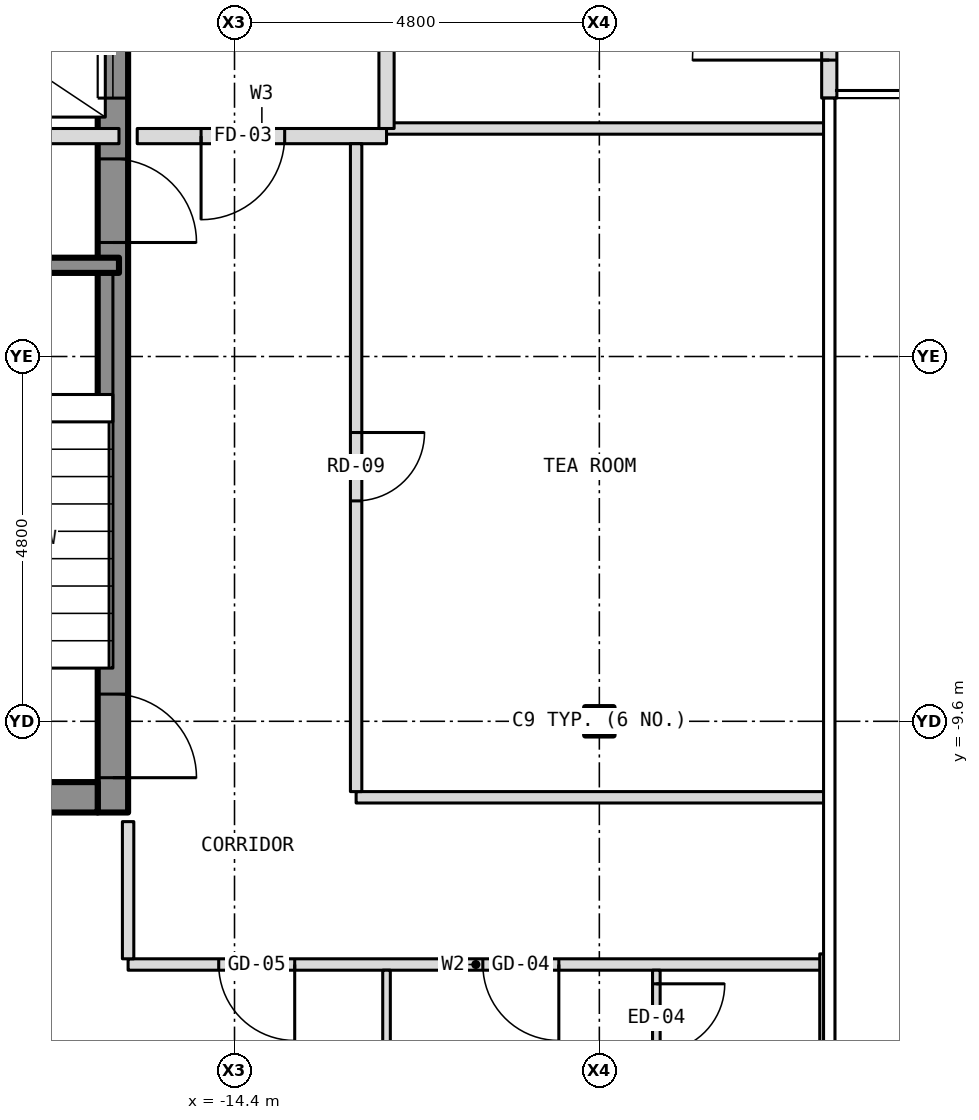
"""IFC4 building model, lengths in metres.
Left out: names, types, materials, properties, quantities, classifications, styles, units other than length and angle.
Written with IfcOpenShell. Run it as: python <this file> out.ifc"""

import sys

from ifc_helpers import new_model, si_unit, direction, frame, frame_2d, origin, origin_2d, place, context, subcontext, project, spatial, rectangle, i_section, extrude, element, fill, save


model = new_model("IFC4")
c1 = context("Model", 3, precision=1e-05, world=origin(), true_north=direction((0.0, 1.0)))
c2 = subcontext(c1, "Body", "Model", "MODEL_VIEW")
j1 = project(units=[si_unit("LENGTHUNIT", "METRE"), si_unit("PLANEANGLEUNIT", "RADIAN")], contexts=[c1])
p1 = place(None, origin())
s1 = spatial("IfcSite", under=j1, at=p1, CompositionType="ELEMENT")
p2 = place(p1, origin())
s2 = spatial("IfcBuilding", under=s1, at=p2, CompositionType="ELEMENT")
p3 = place(p2, frame((0.0, 0.0, 226.0)))
s3 = spatial("IfcBuildingStorey", under=s2, at=p3, CompositionType="ELEMENT", Elevation=226.0)
p4 = place(p3, frame((-9.6, -9.6, -0.15), z_axis=(0.0, 0.0, 1.0), x_axis=(1.0, 0.0, 0.0)))
e1 = element("IfcColumn", 1, at=p4, inside=s3, PredefinedType="COLUMN", context=c2, shape_type="SweptSolid", body=[
    extrude(i_section(OverallWidth=0.373, OverallDepth=0.373, WebThickness=0.016, FlangeThickness=0.026, at=origin_2d()), origin(), (0.0, 0.0, 1.0), 3.5),
])
p5 = place(p3, frame((-16.0, -10.8, 0.0), z_axis=(0.0, 0.0, 1.0), x_axis=(0.0, 1.0, 0.0)))
e2 = element("IfcWall", 2, at=p5, inside=s3, PredefinedType="SHEAR", context=c2, shape_type="SweptSolid", body=[
    extrude(rectangle(XDim=21.6, YDim=0.4, at=frame_2d((10.8, 0.0))), origin(), (0.0, 0.0, 1.0), 3.25),
])
p6 = place(p5, frame((9.4, 0.0, 0.0)))
e3 = element("IfcOpeningElement", 3, at=p6, cuts=e2, PredefinedType="OPENING", context=c2, shape_type="SweptSolid", body=[
    extrude(rectangle(XDim=1.1, YDim=2.1, at=frame_2d((0.55, 1.05))), frame((0.0, 0.212, 0.0), z_axis=(0.0, -1.0, 0.0), x_axis=(1.0, 0.0, 0.0)), (0.0, 0.0, 1.0), 0.424),
])
p7 = place(p5, frame((11.5, 0.0, 0.0)))
e4 = element("IfcOpeningElement", 4, at=p7, cuts=e2, PredefinedType="OPENING", context=c2, shape_type="SweptSolid", body=[
    extrude(rectangle(XDim=1.1, YDim=2.1, at=frame_2d((0.55, 1.05))), frame((0.0, 0.212, 0.0), z_axis=(0.0, -1.0, 0.0), x_axis=(1.0, 0.0, 0.0)), (0.0, 0.0, 1.0), 0.424),
])
p8 = place(p5, frame((13.6, 0.0, 0.0)))
e5 = element("IfcOpeningElement", 5, at=p8, cuts=e2, PredefinedType="OPENING", context=c2, shape_type="SweptSolid", body=[
    extrude(rectangle(XDim=1.1, YDim=2.1, at=frame_2d((0.55, 1.05))), frame((0.0, 0.212, 0.0), z_axis=(0.0, -1.0, 0.0), x_axis=(1.0, 0.0, 0.0)), (0.0, 0.0, 1.0), 0.424),
])
p9 = place(p5, frame((15.7, 0.0, 0.0)))
e6 = element("IfcOpeningElement", 6, at=p9, cuts=e2, PredefinedType="OPENING", context=c2, shape_type="SweptSolid", body=[
    extrude(rectangle(XDim=1.1, YDim=2.1, at=frame_2d((0.55, 1.05))), frame((0.0, 0.212, 0.0), z_axis=(0.0, -1.0, 0.0), x_axis=(1.0, 0.0, 0.0)), (0.0, 0.0, 1.0), 0.424),
])
p10 = place(p5, frame((17.8, 0.0, 0.0)))
e7 = element("IfcOpeningElement", 7, at=p10, cuts=e2, PredefinedType="OPENING", context=c2, shape_type="SweptSolid", body=[
    extrude(rectangle(XDim=1.1, YDim=2.1, at=frame_2d((0.55, 1.05))), frame((0.0, 0.212, 0.0), z_axis=(0.0, -1.0, 0.0), x_axis=(1.0, 0.0, 0.0)), (0.0, 0.0, 1.0), 0.424),
])
p11 = place(p5, frame((0.458, 0.0, 0.0)))
e8 = element("IfcOpeningElement", 8, at=p11, cuts=e2, PredefinedType="OPENING", context=c2, shape_type="SweptSolid", body=[
    extrude(rectangle(XDim=1.1, YDim=2.1, at=frame_2d((0.55, 1.05))), frame((0.0, 0.212, 0.0), z_axis=(0.0, -1.0, 0.0), x_axis=(1.0, 0.0, 0.0)), (0.0, 0.0, 1.0), 0.424),
])
p12 = place(p5, frame((7.5, 0.0, 0.0)))
e9 = element("IfcOpeningElement", 9, at=p12, cuts=e2, PredefinedType="OPENING", context=c2, shape_type="SweptSolid", body=[
    extrude(rectangle(XDim=1.1, YDim=2.1, at=frame_2d((0.55, 1.05))), frame((0.0, 0.212, 0.0), z_axis=(0.0, -1.0, 0.0), x_axis=(1.0, 0.0, 0.0)), (0.0, 0.0, 1.0), 0.424),
])
p13 = place(p5, frame((20.0, 0.0, 0.0)))
e10 = element("IfcOpeningElement", 10, at=p13, cuts=e2, PredefinedType="OPENING", context=c2, shape_type="SweptSolid", body=[
    extrude(rectangle(XDim=0.9, YDim=2.1, at=frame_2d((0.45, 1.05))), frame((0.0, 0.212, 0.0), z_axis=(0.0, -1.0, 0.0), x_axis=(1.0, 0.0, 0.0)), (0.0, 0.0, 1.0), 0.424),
])
p14 = place(p3, frame((-20.0, -10.6, 0.0), z_axis=(0.0, 0.0, 1.0), x_axis=(1.0, 0.0, 0.0)))
e11 = element("IfcWall", 11, at=p14, inside=s3, PredefinedType="SHEAR", context=c2, shape_type="SweptSolid", body=[
    extrude(rectangle(XDim=3.8, YDim=0.4, at=frame_2d((1.9, 0.0))), origin(), (0.0, 0.0, 1.0), 3.25),
])
p15 = place(p3, frame((-6.575, -1.4, 0.0), z_axis=(0.0, 0.0, 1.0), x_axis=(0.0, 1.0, 0.0)))
e12 = element("IfcWall", 12, at=p15, inside=s3, PredefinedType="SOLIDWALL", context=c2, shape_type="SweptSolid", body=[
    extrude(rectangle(XDim=2.8, YDim=0.2, at=frame_2d((1.4, 0.0))), origin(), (0.0, 0.0, 1.0), 3.5),
])
p16 = place(p15, frame((0.5, 0.0, 0.0)))
e13 = element("IfcOpeningElement", 13, at=p16, cuts=e12, PredefinedType="OPENING", context=c2, shape_type="SweptSolid", body=[
    extrude(rectangle(XDim=1.8, YDim=2.1, at=frame_2d((0.9, 1.05))), frame((0.0, 0.112, 0.0), z_axis=(0.0, -1.0, 0.0), x_axis=(1.0, 0.0, 0.0)), (0.0, 0.0, 1.0), 0.224),
])
p17 = place(p3, frame((-15.8, -12.8, 0.0), z_axis=(0.0, 0.0, 1.0), x_axis=(1.0, 0.0, 0.0)))
e14 = element("IfcWall", 14, at=p17, inside=s3, PredefinedType="PARTITIONING", context=c2, shape_type="SweptSolid", body=[
    extrude(rectangle(XDim=9.15, YDim=0.15, at=frame_2d((4.575, 0.0))), origin(), (0.0, 0.0, 1.0), 3.35),
])
p18 = place(p17, frame((4.667, 0.0, 0.0)))
e15 = element("IfcOpeningElement", 15, at=p18, cuts=e14, PredefinedType="OPENING", context=c2, shape_type="SweptSolid", body=[
    extrude(rectangle(XDim=1.0, YDim=2.1, at=frame_2d((0.5, 1.05))), frame((0.0, 0.087, 0.0), z_axis=(0.0, -1.0, 0.0), x_axis=(1.0, 0.0, 0.0)), (0.0, 0.0, 1.0), 0.174),
])
p19 = place(p17, frame((1.192, 0.0, 0.0)))
e16 = element("IfcOpeningElement", 16, at=p19, cuts=e14, PredefinedType="OPENING", context=c2, shape_type="SweptSolid", body=[
    extrude(rectangle(XDim=1.0, YDim=2.1, at=frame_2d((0.5, 1.05))), frame((0.0, 0.087, 0.0), z_axis=(0.0, -1.0, 0.0), x_axis=(1.0, 0.0, 0.0)), (0.0, 0.0, 1.0), 0.174),
])
p20 = place(p3, frame((-12.8, -10.6, 0.0), z_axis=(0.0, 0.0, 1.0), x_axis=(1.0, 0.0, 0.0)))
e17 = element("IfcWall", 17, at=p20, inside=s3, PredefinedType="PARTITIONING", context=c2, shape_type="SweptSolid", body=[
    extrude(rectangle(XDim=6.18, YDim=0.15, at=frame_2d((3.09, 0.0))), origin(), (0.0, 0.0, 1.0), 3.35),
])
p21 = place(p3, frame((-20.28, -3.6, 0.0), z_axis=(0.0, 0.0, 1.0), x_axis=(1.0, 0.0, 0.0)))
e18 = element("IfcWall", 18, at=p21, inside=s3, PredefinedType="SHEAR", context=c2, shape_type="SweptSolid", body=[
    extrude(rectangle(XDim=4.36, YDim=0.2, at=frame_2d((2.18, 0.0))), origin(), (0.0, 0.0, 1.0), 3.25),
])
p22 = place(p3, frame((-20.28, -1.9, 0.0), z_axis=(0.0, 0.0, 1.0), x_axis=(1.0, 0.0, 0.0)))
e19 = element("IfcWall", 19, at=p22, inside=s3, PredefinedType="PARTITIONING", context=c2, shape_type="SweptSolid", body=[
    extrude(rectangle(XDim=4.36, YDim=0.2, at=frame_2d((2.18, 0.0))), origin(), (0.0, 0.0, 1.0), 3.25),
])
p23 = place(p22, frame((0.28, 0.0, 0.0)))
e20 = element("IfcOpeningElement", 20, at=p23, cuts=e19, PredefinedType="OPENING", context=c2, shape_type="SweptSolid", body=[
    extrude(rectangle(XDim=0.9, YDim=2.1, at=frame_2d((0.45, 1.05))), frame((0.0, 0.112, 0.0), z_axis=(0.0, -1.0, 0.0), x_axis=(1.0, 0.0, 0.0)), (0.0, 0.0, 1.0), 0.224),
])
p24 = place(p3, frame((-15.68, -1.9, 0.0), z_axis=(0.0, 0.0, 1.0), x_axis=(1.0, 0.0, 0.0)))
e21 = element("IfcWall", 21, at=p24, inside=s3, PredefinedType="PARTITIONING", context=c2, shape_type="SweptSolid", body=[
    extrude(rectangle(XDim=3.28, YDim=0.2, at=frame_2d((1.64, 0.0))), origin(), (0.0, 0.0, 1.0), 3.35),
])
p25 = place(p24, frame((0.84, 0.0, 0.0)))
e22 = element("IfcOpeningElement", 22, at=p25, cuts=e21, PredefinedType="OPENING", context=c2, shape_type="SweptSolid", body=[
    extrude(rectangle(XDim=1.1, YDim=2.1, at=frame_2d((0.55, 1.05))), frame((0.0, 0.112, 0.0), z_axis=(0.0, -1.0, 0.0), x_axis=(1.0, 0.0, 0.0)), (0.0, 0.0, 1.0), 0.224),
])
p26 = place(p3, frame((-12.4, -1.8, 0.0), z_axis=(0.0, 0.0, 1.0), x_axis=(1.0, 0.0, 0.0)))
e23 = element("IfcWall", 23, at=p26, inside=s3, PredefinedType="PARTITIONING", context=c2, shape_type="SweptSolid", body=[
    extrude(rectangle(XDim=5.78, YDim=0.15, at=frame_2d((2.89, 0.0))), origin(), (0.0, 0.0, 1.0), 3.35),
])
p27 = place(p3, frame((-15.8, -12.725, 0.0), z_axis=(0.0, 0.0, 1.0), x_axis=(0.0, 1.0, 0.0)))
e24 = element("IfcWall", 24, at=p27, inside=s3, PredefinedType="PARTITIONING", context=c2, shape_type="SweptSolid", body=[
    extrude(rectangle(XDim=1.805, YDim=0.15, at=frame_2d((0.903, 0.0))), origin(), (0.0, 0.0, 1.0), 3.35),
])
p28 = place(p3, frame((-12.8, -10.525, 0.0), z_axis=(0.0, 0.0, 1.0), x_axis=(0.0, 1.0, 0.0)))
e25 = element("IfcWall", 25, at=p28, inside=s3, PredefinedType="PARTITIONING", context=c2, shape_type="SweptSolid", body=[
    extrude(rectangle(XDim=8.525, YDim=0.15, at=frame_2d((4.262, 0.0))), origin(), (0.0, 0.0, 1.0), 3.35),
])
p29 = place(p28, frame((3.825, 0.0, 0.0)))
e26 = element("IfcOpeningElement", 26, at=p29, cuts=e25, PredefinedType="OPENING", context=c2, shape_type="SweptSolid", body=[
    extrude(rectangle(XDim=0.9, YDim=2.1, at=frame_2d((0.45, 1.05))), frame((0.0, 0.087, 0.0), z_axis=(0.0, -1.0, 0.0), x_axis=(1.0, 0.0, 0.0)), (0.0, 0.0, 1.0), 0.174),
])
p30 = place(p3, frame((-12.4, -20.78, 0.0), z_axis=(0.0, 0.0, 1.0), x_axis=(0.0, 1.0, 0.0)))
e27 = element("IfcWall", 27, at=p30, inside=s3, PredefinedType="PARTITIONING", context=c2, shape_type="SweptSolid", body=[
    extrude(rectangle(XDim=7.905, YDim=0.1, at=frame_2d((3.953, 0.0))), origin(), (0.0, 0.0, 1.0), 3.35),
])
p31 = place(p3, frame((-12.4, -1.8, 0.0), z_axis=(0.0, 0.0, 1.0), x_axis=(0.0, 1.0, 0.0)))
e28 = element("IfcWall", 28, at=p31, inside=s3, PredefinedType="PARTITIONING", context=c2, shape_type="SweptSolid", body=[
    extrude(rectangle(XDim=4.0, YDim=0.2, at=frame_2d((2.0, 0.0))), origin(), (0.0, 0.0, 1.0), 3.35),
])
p32 = place(p31, frame((1.25, 0.0, 0.0)))
e29 = element("IfcOpeningElement", 29, at=p32, cuts=e28, PredefinedType="OPENING", context=c2, shape_type="SweptSolid", body=[
    extrude(rectangle(XDim=1.1, YDim=2.1, at=frame_2d((0.55, 1.05))), frame((0.0, 0.112, 0.0), z_axis=(0.0, -1.0, 0.0), x_axis=(1.0, 0.0, 0.0)), (0.0, 0.0, 1.0), 0.224),
])
p33 = place(p3, frame((-8.85, -15.95, 0.0), z_axis=(0.0, 0.0, 1.0), x_axis=(0.0, 1.0, 0.0)))
e30 = element("IfcWall", 30, at=p33, inside=s3, PredefinedType="PARTITIONING", context=c2, shape_type="SweptSolid", body=[
    extrude(rectangle(XDim=3.075, YDim=0.1, at=frame_2d((1.538, 0.0))), origin(), (0.0, 0.0, 1.0), 3.35),
])
p34 = place(p33, frame((1.996, 0.0, 0.0)))
e31 = element("IfcOpeningElement", 31, at=p34, cuts=e30, PredefinedType="OPENING", context=c2, shape_type="SweptSolid", body=[
    extrude(rectangle(XDim=0.9, YDim=2.1, at=frame_2d((0.45, 1.05))), frame((0.0, 0.062, 0.0), z_axis=(0.0, -1.0, 0.0), x_axis=(1.0, 0.0, 0.0)), (0.0, 0.0, 1.0), 0.124),
])
p35 = place(p3, frame((-6.65, -16.14, 0.0), z_axis=(0.0, 0.0, 1.0), x_axis=(0.0, 1.0, 0.0)))
e32 = element("IfcWall", 32, at=p35, inside=s3, PredefinedType="PARTITIONING", context=c2, shape_type="SweptSolid", body=[
    extrude(rectangle(XDim=3.48, YDim=0.1, at=frame_2d((1.74, 0.0))), origin(), (0.0, 0.0, 1.0), 3.35),
])
p36 = place(p16, origin())
e33 = element("IfcDoor", 33, at=p36, inside=s3, OperationType="DOUBLE_DOOR_DOUBLE_SWING", PredefinedType="DOOR", context=c2, shape_type="SweptSolid", body=[
    extrude(rectangle(XDim=1.8, YDim=2.1, at=frame_2d((0.9, 1.05))), frame((0.0, 0.025, 0.0), z_axis=(0.0, -1.0, 0.0), x_axis=(1.0, 0.0, 0.0)), (0.0, 0.0, 1.0), 0.05),
])
fill(e13, e33)
p37 = place(p6, origin())
e34 = element("IfcDoor", 34, at=p37, inside=s3, OperationType="SLIDING_TO_LEFT", PredefinedType="DOOR", context=c2, shape_type="SweptSolid", body=[
    extrude(rectangle(XDim=1.1, YDim=2.1, at=frame_2d((0.55, 1.05))), frame((0.0, 0.025, 0.0), z_axis=(0.0, -1.0, 0.0), x_axis=(1.0, 0.0, 0.0)), (0.0, 0.0, 1.0), 0.05),
])
fill(e3, e34)
p38 = place(p11, origin())
e35 = element("IfcDoor", 35, at=p38, inside=s3, OperationType="SINGLE_SWING_LEFT", PredefinedType="DOOR", context=c2, shape_type="SweptSolid", body=[
    extrude(rectangle(XDim=1.1, YDim=2.1, at=frame_2d((0.55, 1.05))), frame((0.0, 0.025, 0.0), z_axis=(0.0, -1.0, 0.0), x_axis=(1.0, 0.0, 0.0)), (0.0, 0.0, 1.0), 0.05),
])
fill(e8, e35)
p39 = place(p12, origin())
e36 = element("IfcDoor", 36, at=p39, inside=s3, OperationType="SINGLE_SWING_LEFT", PredefinedType="DOOR", context=c2, shape_type="SweptSolid", body=[
    extrude(rectangle(XDim=1.1, YDim=2.1, at=frame_2d((0.55, 1.05))), frame((0.0, 0.025, 0.0), z_axis=(0.0, -1.0, 0.0), x_axis=(1.0, 0.0, 0.0)), (0.0, 0.0, 1.0), 0.05),
])
fill(e9, e36)
p40 = place(p25, origin())
e37 = element("IfcDoor", 37, at=p40, inside=s3, OperationType="SINGLE_SWING_LEFT", PredefinedType="DOOR", context=c2, shape_type="SweptSolid", body=[
    extrude(rectangle(XDim=1.1, YDim=2.1, at=frame_2d((0.55, 1.05))), frame((0.0, 0.025, 0.0), z_axis=(0.0, -1.0, 0.0), x_axis=(1.0, 0.0, 0.0)), (0.0, 0.0, 1.0), 0.05),
])
fill(e22, e37)
p41 = place(p18, origin())
e38 = element("IfcDoor", 38, at=p41, inside=s3, OperationType="SINGLE_SWING_RIGHT", PredefinedType="DOOR", context=c2, shape_type="SweptSolid", body=[
    extrude(rectangle(XDim=1.0, YDim=2.1, at=frame_2d((0.5, 1.05))), frame((0.0, 0.025, 0.0), z_axis=(0.0, -1.0, 0.0), x_axis=(1.0, 0.0, 0.0)), (0.0, 0.0, 1.0), 0.05),
])
fill(e15, e38)
p42 = place(p34, origin())
e39 = element("IfcDoor", 39, at=p42, inside=s3, OperationType="SINGLE_SWING_RIGHT", PredefinedType="DOOR", context=c2, shape_type="SweptSolid", body=[
    extrude(rectangle(XDim=0.9, YDim=2.1, at=frame_2d((0.45, 1.05))), frame((0.0, 0.025, 0.0), z_axis=(0.0, -1.0, 0.0), x_axis=(1.0, 0.0, 0.0)), (0.0, 0.0, 1.0), 0.05),
])
fill(e31, e39)
p43 = place(p19, origin())
e40 = element("IfcDoor", 40, at=p43, inside=s3, OperationType="SINGLE_SWING_RIGHT", PredefinedType="DOOR", context=c2, shape_type="SweptSolid", body=[
    extrude(rectangle(XDim=1.0, YDim=2.1, at=frame_2d((0.5, 1.05))), frame((0.0, 0.025, 0.0), z_axis=(0.0, -1.0, 0.0), x_axis=(1.0, 0.0, 0.0)), (0.0, 0.0, 1.0), 0.05),
])
fill(e16, e40)
p44 = place(p29, origin())
e41 = element("IfcDoor", 41, at=p44, inside=s3, OperationType="SINGLE_SWING_RIGHT", PredefinedType="DOOR", context=c2, shape_type="SweptSolid", body=[
    extrude(rectangle(XDim=0.9, YDim=2.1, at=frame_2d((0.45, 1.05))), frame((0.0, 0.025, 0.0), z_axis=(0.0, -1.0, 0.0), x_axis=(1.0, 0.0, 0.0)), (0.0, 0.0, 1.0), 0.05),
])
fill(e26, e41)
save(model, sys.argv[1])
